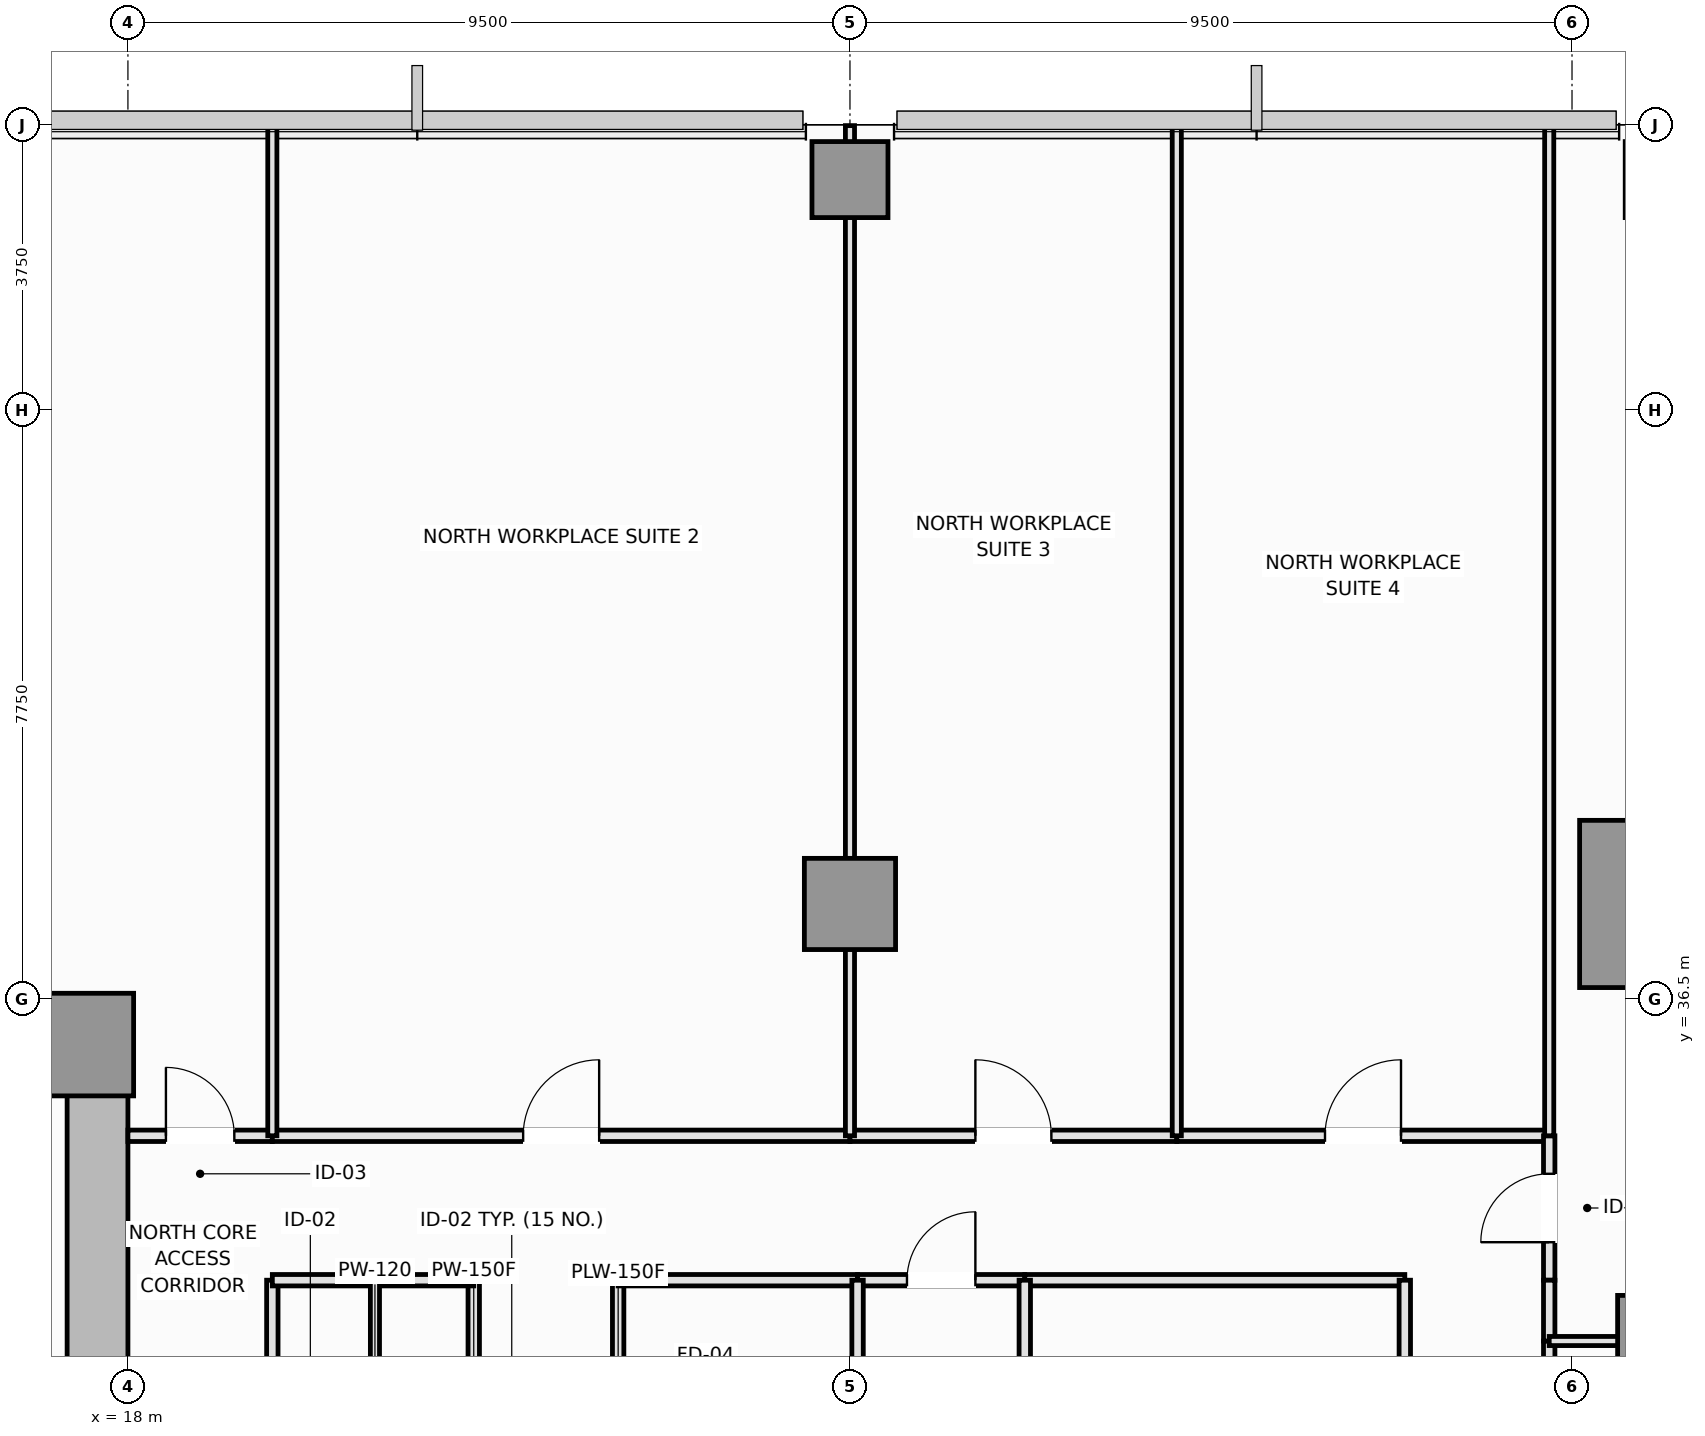
"""IFC4 building model, lengths in metres.
Left out: names, types, materials, properties, quantities, classifications, styles, units other than length and angle.
Written with IfcOpenShell. Run it as: python <this file> out.ifc"""

import sys

from ifc_helpers import new_model, si_unit, direction, frame, frame_2d, origin, origin_2d, place, context, subcontext, project, spatial, rectangle, extrude, element, fill, save


model = new_model("IFC4")
c1 = context("Model", 3, precision=1e-05, world=origin(), true_north=direction((0.0, 1.0)))
c2 = subcontext(c1, "Body", "Model", "MODEL_VIEW")
j1 = project(units=[si_unit("LENGTHUNIT", "METRE"), si_unit("PLANEANGLEUNIT", "RADIAN")], contexts=[c1])
p1 = place(None, origin())
s1 = spatial("IfcSite", under=j1, at=p1, CompositionType="ELEMENT")
p2 = place(p1, origin())
s2 = spatial("IfcBuilding", under=s1, at=p2, CompositionType="ELEMENT")
p3 = place(p2, frame((0.0, 0.0, 75.3)))
s3 = spatial("IfcBuildingStorey", under=s2, at=p3, CompositionType="ELEMENT", Elevation=75.3)
p4 = place(p3, frame((4.5, 36.1, 0.0), z_axis=(0.0, 0.0, 1.0), x_axis=(1.0, 0.0, 0.0)))
e1 = element("IfcWall", 1, at=p4, inside=s3, PredefinedType="SHEAR", context=c2, shape_type="SweptSolid", body=[
    extrude(rectangle(XDim=13.5, YDim=0.8, at=frame_2d((6.75, 0.0))), origin(), (0.0, 0.0, 1.0), 3.55),
])
p5 = place(p3, frame((17.6, 27.05, 0.0), z_axis=(0.0, 0.0, 1.0), x_axis=(0.0, 1.0, 0.0)))
e2 = element("IfcWall", 2, at=p5, inside=s3, PredefinedType="SHEAR", context=c2, shape_type="SweptSolid", body=[
    extrude(rectangle(XDim=8.65, YDim=0.8, at=frame_2d((4.325, 0.0))), origin(), (0.0, 0.0, 1.0), 3.55),
])
p6 = place(p5, frame((3.45, 0.0, 0.0)))
e3 = element("IfcOpeningElement", 3, at=p6, cuts=e2, PredefinedType="OPENING", context=c2, shape_type="SweptSolid", body=[
    extrude(rectangle(XDim=1.1, YDim=2.15, at=frame_2d((0.55, 1.075))), frame((0.0, 0.41, 0.0), z_axis=(0.0, -1.0, 0.0), x_axis=(1.0, 0.0, 0.0)), (0.0, 0.0, 1.0), 0.82),
])
p7 = place(p3, frame((17.4, 35.9, 0.0), z_axis=(0.0, 0.0, 1.0), x_axis=(1.0, 0.0, 0.0)))
e4 = element("IfcColumn", 4, at=p7, inside=s3, PredefinedType="PILASTER", context=c2, shape_type="SweptSolid", body=[
    extrude(rectangle(XDim=1.35, YDim=1.35, at=origin_2d()), origin(), (0.0, 0.0, 1.0), 3.55),
])
p8 = place(p3, frame((38.2, 37.75, 0.0), z_axis=(0.0, 0.0, 1.0), x_axis=(1.0, 0.0, 0.0)))
e5 = element("IfcColumn", 5, at=p8, inside=s3, PredefinedType="COLUMN", context=c2, shape_type="SweptSolid", body=[
    extrude(rectangle(XDim=2.2, YDim=2.2, at=origin_2d()), origin(), (0.0, 0.0, 1.0), 3.55),
])
for number, where, z_axis, x_axis in (
    (6, (27.5, 37.75, 0.0), (0.0, 0.0, 1.0), (1.0, 0.0, 0.0)),
    (7, (38.2, 32.0, 0.0), (0.0, 0.0, 1.0), (1.0, 0.0, 0.0)),
):
    element("IfcColumn", number, at=place(p3, frame(where, z_axis=z_axis, x_axis=x_axis)), inside=s3, PredefinedType="COLUMN", context=c2, shape_type="SweptSolid", body=[
        extrude(rectangle(XDim=1.2, YDim=1.2, at=origin_2d()), origin(), (0.0, 0.0, 1.0), 3.55),
    ])
p9 = place(p3, frame((27.5, 47.28, 0.0), z_axis=(0.0, 0.0, 1.0), x_axis=(1.0, 0.0, 0.0)))
e8 = element("IfcColumn", 8, at=p9, inside=s3, PredefinedType="COLUMN", context=c2, shape_type="SweptSolid", body=[
    extrude(rectangle(XDim=1.0, YDim=1.0, at=origin_2d()), origin(), (0.0, 0.0, 1.0), 3.55),
])
p10 = place(p3, frame((22.55, 29.75, 0.0), z_axis=(0.0, 0.0, 1.0), x_axis=(0.0, 1.0, 0.0)))
e9 = element("IfcWall", 9, at=p10, inside=s3, PredefinedType="PARTITIONING", context=c2, shape_type="SweptSolid", body=[
    extrude(rectangle(XDim=3.05, YDim=0.15, at=frame_2d((1.525, 0.0))), origin(), (0.0, 0.0, 1.0), 3.01),
])
p11 = place(p10, frame((1.025, 0.0, 0.0)))
e10 = element("IfcOpeningElement", 10, at=p11, cuts=e9, PredefinedType="OPENING", context=c2, shape_type="SweptSolid", body=[
    extrude(rectangle(XDim=1.0, YDim=2.15, at=frame_2d((0.5, 1.075))), frame((0.0, 0.085, 0.0), z_axis=(0.0, -1.0, 0.0), x_axis=(1.0, 0.0, 0.0)), (0.0, 0.0, 1.0), 0.17),
])
p12 = place(p3, frame((24.45, 29.7, 0.0), z_axis=(0.0, 0.0, 1.0), x_axis=(0.0, 1.0, 0.0)))
e11 = element("IfcWall", 11, at=p12, inside=s3, PredefinedType="PLUMBINGWALL", context=c2, shape_type="SweptSolid", body=[
    extrude(rectangle(XDim=3.1, YDim=0.15, at=frame_2d((1.55, 0.0))), origin(), (0.0, 0.0, 1.0), 3.37),
])
p13 = place(p12, frame((1.1, 0.0, 0.0)))
e12 = element("IfcOpeningElement", 12, at=p13, cuts=e11, PredefinedType="OPENING", context=c2, shape_type="SweptSolid", body=[
    extrude(rectangle(XDim=0.9, YDim=2.1, at=frame_2d((0.45, 1.05))), frame((0.0, 0.085, 0.0), z_axis=(0.0, -1.0, 0.0), x_axis=(1.0, 0.0, 0.0)), (0.0, 0.0, 1.0), 0.17),
])
p14 = place(p3, frame((19.9, 29.75, 0.0), z_axis=(0.0, 0.0, 1.0), x_axis=(0.0, 1.0, 0.0)))
e13 = element("IfcWall", 13, at=p14, inside=s3, PredefinedType="PARTITIONING", context=c2, shape_type="SweptSolid", body=[
    extrude(rectangle(XDim=3.05, YDim=0.15, at=frame_2d((1.525, 0.0))), origin(), (0.0, 0.0, 1.0), 3.37),
])
p15 = place(p14, frame((1.025, 0.0, 0.0)))
e14 = element("IfcOpeningElement", 14, at=p15, cuts=e13, PredefinedType="OPENING", context=c2, shape_type="SweptSolid", body=[
    extrude(rectangle(XDim=1.0, YDim=2.15, at=frame_2d((0.5, 1.075))), frame((0.0, 0.085, 0.0), z_axis=(0.0, -1.0, 0.0), x_axis=(1.0, 0.0, 0.0)), (0.0, 0.0, 1.0), 0.17),
])
p16 = place(p3, frame((19.9, 32.8, 0.0), z_axis=(0.0, 0.0, 1.0), x_axis=(1.0, 0.0, 0.0)))
e15 = element("IfcWall", 15, at=p16, inside=s3, PredefinedType="PARTITIONING", context=c2, shape_type="SweptSolid", body=[
    extrude(rectangle(XDim=1.35, YDim=0.15, at=frame_2d((0.675, 0.0))), origin(), (0.0, 0.0, 1.0), 3.37),
])
p17 = place(p3, frame((21.25, 32.8, 0.0), z_axis=(0.0, 0.0, 1.0), x_axis=(1.0, 0.0, 0.0)))
e16 = element("IfcWall", 16, at=p17, inside=s3, PredefinedType="PARTITIONING", context=c2, shape_type="SweptSolid", body=[
    extrude(rectangle(XDim=1.3, YDim=0.15, at=frame_2d((0.65, 0.0))), origin(), (0.0, 0.0, 1.0), 3.37),
])
p18 = place(p3, frame((24.45, 32.8, 0.0), z_axis=(0.0, 0.0, 1.0), x_axis=(1.0, 0.0, 0.0)))
e17 = element("IfcWall", 17, at=p18, inside=s3, PredefinedType="PLUMBINGWALL", context=c2, shape_type="SweptSolid", body=[
    extrude(rectangle(XDim=3.15, YDim=0.15, at=frame_2d((1.575, 0.0))), origin(), (0.0, 0.0, 1.0), 3.37),
])
p19 = place(p3, frame((27.6, 32.8, 0.0), z_axis=(0.0, 0.0, 1.0), x_axis=(1.0, 0.0, 0.0)))
e18 = element("IfcWall", 18, at=p19, inside=s3, PredefinedType="PLUMBINGWALL", context=c2, shape_type="SweptSolid", body=[
    extrude(rectangle(XDim=2.2, YDim=0.15, at=frame_2d((1.1, 0.0))), origin(), (0.0, 0.0, 1.0), 3.37),
])
p20 = place(p19, frame((0.65, 0.0, 0.0)))
e19 = element("IfcOpeningElement", 19, at=p20, cuts=e18, PredefinedType="OPENING", context=c2, shape_type="SweptSolid", body=[
    extrude(rectangle(XDim=0.9, YDim=2.1, at=frame_2d((0.45, 1.05))), frame((0.0, 0.085, 0.0), z_axis=(0.0, -1.0, 0.0), x_axis=(1.0, 0.0, 0.0)), (0.0, 0.0, 1.0), 0.17),
])
p21 = place(p3, frame((29.8, 32.8, 0.0), z_axis=(0.0, 0.0, 1.0), x_axis=(1.0, 0.0, 0.0)))
e20 = element("IfcWall", 20, at=p21, inside=s3, PredefinedType="PARTITIONING", context=c2, shape_type="SweptSolid", body=[
    extrude(rectangle(XDim=5.0, YDim=0.15, at=frame_2d((2.5, 0.0))), origin(), (0.0, 0.0, 1.0), 3.37),
])
p22 = place(p3, frame((18.0, 34.7, 0.0), z_axis=(0.0, 0.0, 1.0), x_axis=(1.0, 0.0, 0.0)))
e21 = element("IfcWall", 21, at=p22, inside=s3, PredefinedType="PARTITIONING", context=c2, shape_type="SweptSolid", body=[
    extrude(rectangle(XDim=1.9, YDim=0.15, at=frame_2d((0.95, 0.0))), origin(), (0.0, 0.0, 1.0), 3.37),
])
p23 = place(p22, frame((0.5, 0.0, 0.0)))
e22 = element("IfcOpeningElement", 22, at=p23, cuts=e21, PredefinedType="OPENING", context=c2, shape_type="SweptSolid", body=[
    extrude(rectangle(XDim=0.9, YDim=2.1, at=frame_2d((0.45, 1.05))), frame((0.0, 0.085, 0.0), z_axis=(0.0, -1.0, 0.0), x_axis=(1.0, 0.0, 0.0)), (0.0, 0.0, 1.0), 0.17),
])
p24 = place(p3, frame((19.9, 34.7, 0.0), z_axis=(0.0, 0.0, 1.0), x_axis=(1.0, 0.0, 0.0)))
e23 = element("IfcWall", 23, at=p24, inside=s3, PredefinedType="PARTITIONING", context=c2, shape_type="SweptSolid", body=[
    extrude(rectangle(XDim=7.6, YDim=0.15, at=frame_2d((3.8, 0.0))), origin(), (0.0, 0.0, 1.0), 3.37),
])
p25 = place(p24, frame((3.3, 0.0, 0.0)))
e24 = element("IfcOpeningElement", 24, at=p25, cuts=e23, PredefinedType="OPENING", context=c2, shape_type="SweptSolid", body=[
    extrude(rectangle(XDim=1.0, YDim=2.15, at=frame_2d((0.5, 1.075))), frame((0.0, 0.085, 0.0), z_axis=(0.0, -1.0, 0.0), x_axis=(1.0, 0.0, 0.0)), (0.0, 0.0, 1.0), 0.17),
])
p26 = place(p3, frame((27.5, 34.7, 0.0), z_axis=(0.0, 0.0, 1.0), x_axis=(1.0, 0.0, 0.0)))
e25 = element("IfcWall", 25, at=p26, inside=s3, PredefinedType="PARTITIONING", context=c2, shape_type="SweptSolid", body=[
    extrude(rectangle(XDim=4.3, YDim=0.15, at=frame_2d((2.15, 0.0))), origin(), (0.0, 0.0, 1.0), 3.37),
])
p27 = place(p26, frame((1.65, 0.0, 0.0)))
e26 = element("IfcOpeningElement", 26, at=p27, cuts=e25, PredefinedType="OPENING", context=c2, shape_type="SweptSolid", body=[
    extrude(rectangle(XDim=1.0, YDim=2.15, at=frame_2d((0.5, 1.075))), frame((0.0, 0.085, 0.0), z_axis=(0.0, -1.0, 0.0), x_axis=(1.0, 0.0, 0.0)), (0.0, 0.0, 1.0), 0.17),
])
p28 = place(p3, frame((31.8, 34.7, 0.0), z_axis=(0.0, 0.0, 1.0), x_axis=(1.0, 0.0, 0.0)))
e27 = element("IfcWall", 27, at=p28, inside=s3, PredefinedType="PARTITIONING", context=c2, shape_type="SweptSolid", body=[
    extrude(rectangle(XDim=4.9, YDim=0.15, at=frame_2d((2.45, 0.0))), origin(), (0.0, 0.0, 1.0), 3.37),
])
p29 = place(p28, frame((1.95, 0.0, 0.0)))
e28 = element("IfcOpeningElement", 28, at=p29, cuts=e27, PredefinedType="OPENING", context=c2, shape_type="SweptSolid", body=[
    extrude(rectangle(XDim=1.0, YDim=2.15, at=frame_2d((0.5, 1.075))), frame((0.0, 0.085, 0.0), z_axis=(0.0, -1.0, 0.0), x_axis=(1.0, 0.0, 0.0)), (0.0, 0.0, 1.0), 0.17),
])
p30 = place(p3, frame((36.7, 32.8, 0.0), z_axis=(0.0, 0.0, 1.0), x_axis=(0.0, 1.0, 0.0)))
e29 = element("IfcWall", 29, at=p30, inside=s3, PredefinedType="PARTITIONING", context=c2, shape_type="SweptSolid", body=[
    extrude(rectangle(XDim=1.9, YDim=0.15, at=frame_2d((0.95, 0.0))), origin(), (0.0, 0.0, 1.0), 3.37),
])
p31 = place(p30, frame((0.5, 0.0, 0.0)))
e30 = element("IfcOpeningElement", 30, at=p31, cuts=e29, PredefinedType="OPENING", context=c2, shape_type="SweptSolid", body=[
    extrude(rectangle(XDim=0.9, YDim=2.1, at=frame_2d((0.45, 1.05))), frame((0.0, 0.085, 0.0), z_axis=(0.0, -1.0, 0.0), x_axis=(1.0, 0.0, 0.0)), (0.0, 0.0, 1.0), 0.17),
])
p32 = place(p3, frame((34.8, 29.7, 0.0), z_axis=(0.0, 0.0, 1.0), x_axis=(0.0, 1.0, 0.0)))
e31 = element("IfcWall", 31, at=p32, inside=s3, PredefinedType="PARTITIONING", context=c2, shape_type="SweptSolid", body=[
    extrude(rectangle(XDim=3.1, YDim=0.15, at=frame_2d((1.55, 0.0))), origin(), (0.0, 0.0, 1.0), 3.37),
])
p33 = place(p32, frame((1.05, 0.0, 0.0)))
e32 = element("IfcOpeningElement", 32, at=p33, cuts=e31, PredefinedType="OPENING", context=c2, shape_type="SweptSolid", body=[
    extrude(rectangle(XDim=1.0, YDim=2.15, at=frame_2d((0.5, 1.075))), frame((0.0, 0.085, 0.0), z_axis=(0.0, -1.0, 0.0), x_axis=(1.0, 0.0, 0.0)), (0.0, 0.0, 1.0), 0.17),
])
p34 = place(p3, frame((36.7, 17.7, 0.0), z_axis=(0.0, 0.0, 1.0), x_axis=(0.0, 1.0, 0.0)))
e33 = element("IfcWall", 33, at=p34, inside=s3, PredefinedType="PARTITIONING", context=c2, shape_type="SweptSolid", body=[
    extrude(rectangle(XDim=14.3, YDim=0.15, at=frame_2d((7.15, 0.0))), origin(), (0.0, 0.0, 1.0), 3.37),
])
p35 = place(p34, frame((5.683, 0.0, 0.0)))
e34 = element("IfcOpeningElement", 34, at=p35, cuts=e33, PredefinedType="OPENING", context=c2, shape_type="SweptSolid", body=[
    extrude(rectangle(XDim=1.0, YDim=2.15, at=frame_2d((0.5, 1.075))), frame((0.0, 0.085, 0.0), z_axis=(0.0, -1.0, 0.0), x_axis=(1.0, 0.0, 0.0)), (0.0, 0.0, 1.0), 0.17),
])
p36 = place(p3, frame((36.7, 32.0, 0.0), z_axis=(0.0, 0.0, 1.0), x_axis=(0.0, 1.0, 0.0)))
e35 = element("IfcWall", 35, at=p36, inside=s3, PredefinedType="PARTITIONING", context=c2, shape_type="SweptSolid", body=[
    extrude(rectangle(XDim=0.8, YDim=0.15, at=frame_2d((0.4, 0.0))), origin(), (0.0, 0.0, 1.0), 3.37),
])
p37 = place(p3, frame((21.25, 29.75, 0.0), z_axis=(0.0, 0.0, 1.0), x_axis=(0.0, 1.0, 0.0)))
e36 = element("IfcWall", 36, at=p37, inside=s3, PredefinedType="PARTITIONING", context=c2, shape_type="SweptSolid", body=[
    extrude(rectangle(XDim=3.05, YDim=0.12, at=frame_2d((1.525, 0.0))), origin(), (0.0, 0.0, 1.0), 3.37),
])
for number, where, z_axis, x_axis in (
    (37, (27.6, 29.7, 0.0), (0.0, 0.0, 1.0), (0.0, 1.0, 0.0)),
    (38, (29.8, 29.7, 0.0), (0.0, 0.0, 1.0), (0.0, 1.0, 0.0)),
):
    element("IfcWall", number, at=place(p3, frame(where, z_axis=z_axis, x_axis=x_axis)), inside=s3, PredefinedType="PLUMBINGWALL", context=c2, shape_type="SweptSolid", body=[
        extrude(rectangle(XDim=3.1, YDim=0.15, at=frame_2d((1.55, 0.0))), origin(), (0.0, 0.0, 1.0), 3.37),
    ])
p38 = place(p3, frame((19.9, 34.7, 0.0), z_axis=(0.0, 0.0, 1.0), x_axis=(0.0, 1.0, 0.0)))
e39 = element("IfcWall", 39, at=p38, inside=s3, PredefinedType="PARTITIONING", context=c2, shape_type="SweptSolid", body=[
    extrude(rectangle(XDim=13.29, YDim=0.12, at=frame_2d((6.645, 0.0))), origin(), (0.0, 0.0, 1.0), 3.37),
])
p39 = place(p3, frame((27.5, 34.7, 0.0), z_axis=(0.0, 0.0, 1.0), x_axis=(0.0, 1.0, 0.0)))
e40 = element("IfcWall", 40, at=p39, inside=s3, PredefinedType="PARTITIONING", context=c2, shape_type="SweptSolid", body=[
    extrude(rectangle(XDim=13.29, YDim=0.12, at=frame_2d((6.645, 0.0))), origin(), (0.0, 0.0, 1.0), 2.82),
])
for number, where, z_axis, x_axis in (
    (41, (31.8, 34.7, 0.0), (0.0, 0.0, 1.0), (0.0, 1.0, 0.0)),
    (42, (36.7, 34.7, 0.0), (0.0, 0.0, 1.0), (0.0, 1.0, 0.0)),
):
    element("IfcWall", number, at=place(p3, frame(where, z_axis=z_axis, x_axis=x_axis)), inside=s3, PredefinedType="PARTITIONING", context=c2, shape_type="SweptSolid", body=[
        extrude(rectangle(XDim=13.29, YDim=0.12, at=frame_2d((6.645, 0.0))), origin(), (0.0, 0.0, 1.0), 3.37),
    ])
p40 = place(p3, frame((36.7, 32.0, 0.0), z_axis=(0.0, 0.0, 1.0), x_axis=(1.0, 0.0, 0.0)))
e43 = element("IfcWall", 43, at=p40, inside=s3, PredefinedType="PARTITIONING", context=c2, shape_type="SweptSolid", body=[
    extrude(rectangle(XDim=16.79, YDim=0.12, at=frame_2d((8.395, 0.0))), origin(), (0.0, 0.0, 1.0), 2.72),
])
p41 = place(p20, origin())
e44 = element("IfcDoor", 44, at=p41, inside=s3, OperationType="SINGLE_SWING_RIGHT", PredefinedType="DOOR", context=c2, shape_type="SweptSolid", body=[
    extrude(rectangle(XDim=0.9, YDim=2.1, at=frame_2d((0.45, 1.05))), frame((0.0, 0.025, 0.0), z_axis=(0.0, -1.0, 0.0), x_axis=(1.0, 0.0, 0.0)), (0.0, 0.0, 1.0), 0.05),
])
fill(e19, e44)
p42 = place(p23, origin())
e45 = element("IfcDoor", 45, at=p42, inside=s3, OperationType="SINGLE_SWING_LEFT", PredefinedType="DOOR", context=c2, shape_type="SweptSolid", body=[
    extrude(rectangle(XDim=0.9, YDim=2.1, at=frame_2d((0.45, 1.05))), frame((0.0, 0.025, 0.0), z_axis=(0.0, -1.0, 0.0), x_axis=(1.0, 0.0, 0.0)), (0.0, 0.0, 1.0), 0.05),
])
fill(e22, e45)
p43 = place(p25, origin())
e46 = element("IfcDoor", 46, at=p43, inside=s3, OperationType="SINGLE_SWING_RIGHT", PredefinedType="DOOR", context=c2, shape_type="SweptSolid", body=[
    extrude(rectangle(XDim=1.0, YDim=2.15, at=frame_2d((0.5, 1.075))), frame((0.0, 0.025, 0.0), z_axis=(0.0, -1.0, 0.0), x_axis=(1.0, 0.0, 0.0)), (0.0, 0.0, 1.0), 0.05),
])
fill(e24, e46)
p44 = place(p27, origin())
e47 = element("IfcDoor", 47, at=p44, inside=s3, OperationType="SINGLE_SWING_LEFT", PredefinedType="DOOR", context=c2, shape_type="SweptSolid", body=[
    extrude(rectangle(XDim=1.0, YDim=2.15, at=frame_2d((0.5, 1.075))), frame((0.0, 0.025, 0.0), z_axis=(0.0, -1.0, 0.0), x_axis=(1.0, 0.0, 0.0)), (0.0, 0.0, 1.0), 0.05),
])
fill(e26, e47)
p45 = place(p29, origin())
e48 = element("IfcDoor", 48, at=p45, inside=s3, OperationType="SINGLE_SWING_RIGHT", PredefinedType="DOOR", context=c2, shape_type="SweptSolid", body=[
    extrude(rectangle(XDim=1.0, YDim=2.15, at=frame_2d((0.5, 1.075))), frame((0.0, 0.025, 0.0), z_axis=(0.0, -1.0, 0.0), x_axis=(1.0, 0.0, 0.0)), (0.0, 0.0, 1.0), 0.05),
])
fill(e28, e48)
p46 = place(p31, origin())
e49 = element("IfcDoor", 49, at=p46, inside=s3, OperationType="SINGLE_SWING_LEFT", PredefinedType="DOOR", context=c2, shape_type="SweptSolid", body=[
    extrude(rectangle(XDim=0.9, YDim=2.1, at=frame_2d((0.45, 1.05))), frame((0.0, 0.025, 0.0), z_axis=(0.0, -1.0, 0.0), x_axis=(1.0, 0.0, 0.0)), (0.0, 0.0, 1.0), 0.05),
])
fill(e30, e49)
save(model, sys.argv[1])
